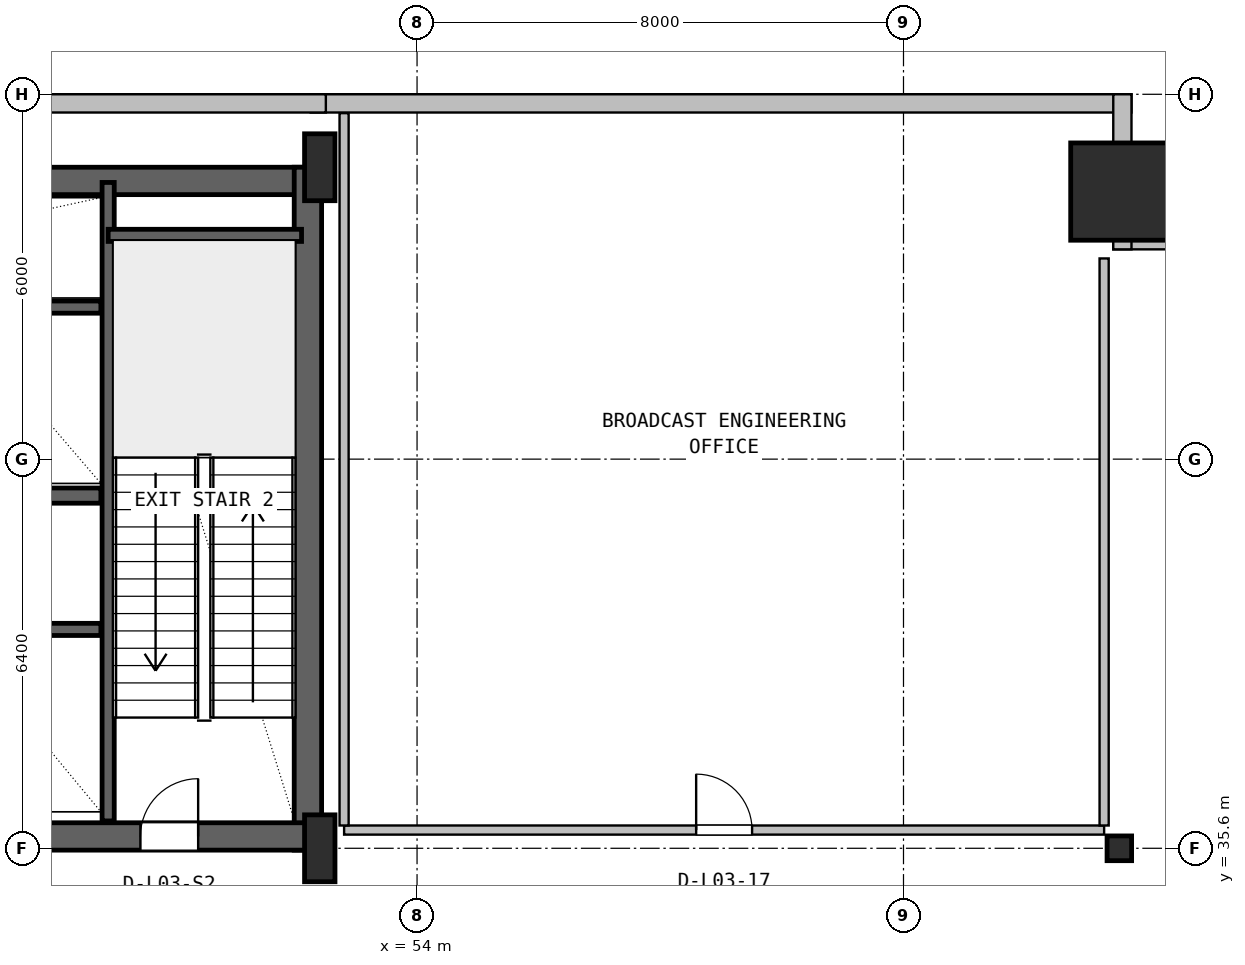
"""IFC4 building model, lengths in metres.
Left out: names, types, materials, properties, quantities, classifications, styles, units other than length and angle.
Written with IfcOpenShell. Run it as: python <this file> out.ifc"""

import sys

from ifc_helpers import new_model, si_unit, direction, frame, frame_2d, origin, origin_2d, place, context, subcontext, project, spatial, rectangle, hollow_rectangle, i_section, extrude, source, transform, mapped, element, fill, save


model = new_model("IFC4")
c1 = context("Model", 3, precision=1e-05, world=origin(), true_north=direction((0.0, 1.0)))
c2 = subcontext(c1, "Body", "Model", "MODEL_VIEW")
j1 = project(units=[si_unit("LENGTHUNIT", "METRE"), si_unit("PLANEANGLEUNIT", "RADIAN")], contexts=[c1])
p1 = place(None, origin())
s1 = spatial("IfcSite", under=j1, at=p1, CompositionType="ELEMENT")
p2 = place(p1, origin())
s2 = spatial("IfcBuilding", under=s1, at=p2, CompositionType="ELEMENT")
p3 = place(p2, frame((0.0, 0.0, 16.8)))
s3 = spatial("IfcBuildingStorey", under=s2, at=p3, CompositionType="ELEMENT", Elevation=16.8)
p4 = place(p3, frame((15.6, 46.575, 0.0), z_axis=(0.0, 0.0, 1.0), x_axis=(1.0, 0.0, 0.0)))
e1 = element("IfcWall", 1, at=p4, inside=s3, PredefinedType="SHEAR", context=c2, shape_type="SweptSolid", body=[
    extrude(rectangle(XDim=36.8, YDim=0.45, at=frame_2d((18.4, 0.0))), origin(), (0.0, 0.0, 1.0), 5.08),
])
p5 = place(p3, frame((52.205, 35.57, 0.0), z_axis=(0.0, 0.0, 1.0), x_axis=(0.0, 1.0, 0.0)))
e2 = element("IfcWall", 2, at=p5, inside=s3, PredefinedType="SHEAR", context=c2, shape_type="SweptSolid", body=[
    extrude(rectangle(XDim=11.23, YDim=0.45, at=frame_2d((5.615, 0.0))), origin(), (0.0, 0.0, 1.0), 5.08),
])
p6 = place(p3, frame((43.2, 35.795, 0.0), z_axis=(0.0, 0.0, 1.0), x_axis=(1.0, 0.0, 0.0)))
e3 = element("IfcWall", 3, at=p6, inside=s3, PredefinedType="SHEAR", context=c2, shape_type="SweptSolid", body=[
    extrude(rectangle(XDim=9.23, YDim=0.45, at=frame_2d((4.615, 0.0))), origin(), (0.0, 0.0, 1.0), 5.08),
])
p7 = place(p6, frame((6.25, 0.0, 0.0)))
e4 = element("IfcOpeningElement", 4, at=p7, cuts=e3, PredefinedType="OPENING", context=c2, shape_type="SweptSolid", body=[
    extrude(rectangle(XDim=0.95, YDim=2.1, at=frame_2d((0.475, 1.05))), frame((0.0, 0.235, 0.0), z_axis=(0.0, -1.0, 0.0), x_axis=(1.0, 0.0, 0.0)), (0.0, 0.0, 1.0), 0.47),
])
m1 = source(origin(), c2, "Body", "SweptSolid", [
    extrude(i_section(OverallWidth=0.5, OverallDepth=1.1, WebThickness=0.018, FlangeThickness=0.032, FilletRadius=0.018, at=origin_2d()), origin(), (0.0, 0.0, 1.0), 5.4),
])
for number, where, z_axis, x_axis in (
    (5, (52.4, 35.6, 0.0), (0.0, 0.0, 1.0), (1.0, 0.0, 0.0)),
    (6, (52.4, 46.8, 0.0), (0.0, 0.0, 1.0), (1.0, 0.0, 0.0)),
):
    element("IfcColumn", number, at=place(p3, frame(where, z_axis=z_axis, x_axis=x_axis)), inside=s3, PredefinedType="COLUMN", context=c2, shape_type="MappedRepresentation", body=[
        mapped(m1, transform((0.0, 0.0, 0.0), x_axis=(1.0, 0.0, 0.0), y_axis=(0.0, 1.0, 0.0), z_axis=(0.0, 0.0, 1.0), scale=1.0)),
    ])
m2 = source(origin(), c2, "Body", "SweptSolid", [
    extrude(hollow_rectangle(XDim=1.6, YDim=1.6, WallThickness=0.06, at=origin_2d()), origin(), (0.0, 0.0, 1.0), 5.4),
])
p8 = place(p3, frame((65.55, 46.4, 0.0), z_axis=(0.0, 0.0, 1.0), x_axis=(1.0, 0.0, 0.0)))
e7 = element("IfcColumn", 7, at=p8, inside=s3, PredefinedType="COLUMN", context=c2, shape_type="MappedRepresentation", body=[
    mapped(m2, transform((0.0, 0.0, 0.0), x_axis=(1.0, 0.0, 0.0), y_axis=(0.0, 1.0, 0.0), z_axis=(0.0, 0.0, 1.0), scale=1.0)),
])
m3 = source(origin(), c2, "Body", "SweptSolid", [
    extrude(i_section(OverallWidth=0.404, OverallDepth=0.407, WebThickness=0.027, FlangeThickness=0.044, FilletRadius=0.018, at=origin_2d()), origin(), (0.0, 0.0, 1.0), 5.4),
])
p9 = place(p3, frame((65.55, 35.6, 0.0), z_axis=(0.0, 0.0, 1.0), x_axis=(1.0, 0.0, 0.0)))
e8 = element("IfcColumn", 8, at=p9, inside=s3, PredefinedType="COLUMN", context=c2, shape_type="MappedRepresentation", body=[
    mapped(m3, transform((0.0, 0.0, 0.0), x_axis=(1.0, 0.0, 0.0), y_axis=(0.0, 1.0, 0.0), z_axis=(0.0, 0.0, 1.0), scale=1.0)),
])
p10 = place(p3, frame((52.25, 47.85, 0.0), z_axis=(0.0, 0.0, 1.0), x_axis=(1.0, 0.0, 0.0)))
e9 = element("IfcWall", 9, at=p10, inside=s3, PredefinedType="SOLIDWALL", context=c2, shape_type="SweptSolid", body=[
    extrude(rectangle(XDim=13.5, YDim=0.3, at=frame_2d((6.75, 0.0))), origin(), (0.0, 0.0, 1.0), 5.06),
])
p11 = place(p3, frame((15.5, 47.85, 0.0), z_axis=(0.0, 0.0, 1.0), x_axis=(1.0, 0.0, 0.0)))
e10 = element("IfcWall", 10, at=p11, inside=s3, PredefinedType="SOLIDWALL", context=c2, shape_type="SweptSolid", body=[
    extrude(rectangle(XDim=37.0, YDim=0.3, at=frame_2d((18.5, 0.0))), origin(), (0.0, 0.0, 1.0), 5.06),
])
for number, where, z_axis, x_axis in (
    (11, (65.45, 45.6, 0.0), (0.0, 0.0, 1.0), (1.0, 0.0, 0.0)),
    (12, (65.6, 45.45, 0.0), (0.0, 0.0, 1.0), (0.0, 1.0, 0.0)),
):
    element("IfcWall", number, at=place(p3, frame(where, z_axis=z_axis, x_axis=x_axis)), inside=s3, PredefinedType="SOLIDWALL", context=c2, shape_type="SweptSolid", body=[
        extrude(rectangle(XDim=2.55, YDim=0.3, at=frame_2d((1.275, 0.0))), origin(), (0.0, 0.0, 1.0), 4.143),
    ])
p12 = place(p3, frame((48.92, 36.05, 0.0), z_axis=(0.0, 0.0, 1.0), x_axis=(0.0, 1.0, 0.0)))
e13 = element("IfcWall", 13, at=p12, inside=s3, PredefinedType="SHEAR", context=c2, shape_type="SweptSolid", body=[
    extrude(rectangle(XDim=10.5, YDim=0.2, at=frame_2d((5.25, 0.0))), origin(), (0.0, 0.0, 1.0), 5.08),
])
p13 = place(p3, frame((48.92, 45.68, 0.0), z_axis=(0.0, 0.0, 1.0), x_axis=(1.0, 0.0, 0.0)))
e14 = element("IfcWall", 14, at=p13, inside=s3, PredefinedType="SHEAR", context=c2, shape_type="SweptSolid", body=[
    extrude(rectangle(XDim=3.18, YDim=0.2, at=frame_2d((1.59, 0.0))), origin(), (0.0, 0.0, 1.0), 5.08),
])
p14 = place(p3, frame((24.98, 41.4, 0.0), z_axis=(0.0, 0.0, 1.0), x_axis=(1.0, 0.0, 0.0)))
e15 = element("IfcWall", 15, at=p14, inside=s3, PredefinedType="SHEAR", context=c2, shape_type="SweptSolid", body=[
    extrude(rectangle(XDim=23.82, YDim=0.25, at=frame_2d((11.91, 0.0))), origin(), (0.0, 0.0, 1.0), 5.08),
])
p15 = place(p14, frame((0.87, 0.0, 0.0)))
e16 = element("IfcOpeningElement", 16, at=p15, cuts=e15, PredefinedType="OPENING", context=c2, shape_type="SweptSolid", body=[
    extrude(rectangle(XDim=1.1, YDim=2.18, at=frame_2d((0.55, 1.09))), frame((0.0, 0.135, 0.0), z_axis=(0.0, -1.0, 0.0), x_axis=(1.0, 0.0, 0.0)), (0.0, 0.0, 1.0), 0.27),
])
p16 = place(p14, frame((3.47, 0.0, 0.0)))
e17 = element("IfcOpeningElement", 17, at=p16, cuts=e15, PredefinedType="OPENING", context=c2, shape_type="SweptSolid", body=[
    extrude(rectangle(XDim=1.1, YDim=2.18, at=frame_2d((0.55, 1.09))), frame((0.0, 0.135, 0.0), z_axis=(0.0, -1.0, 0.0), x_axis=(1.0, 0.0, 0.0)), (0.0, 0.0, 1.0), 0.27),
])
p17 = place(p14, frame((6.07, 0.0, 0.0)))
e18 = element("IfcOpeningElement", 18, at=p17, cuts=e15, PredefinedType="OPENING", context=c2, shape_type="SweptSolid", body=[
    extrude(rectangle(XDim=1.1, YDim=2.18, at=frame_2d((0.55, 1.09))), frame((0.0, 0.135, 0.0), z_axis=(0.0, -1.0, 0.0), x_axis=(1.0, 0.0, 0.0)), (0.0, 0.0, 1.0), 0.27),
])
p18 = place(p3, frame((41.22, 44.5, 0.0), z_axis=(0.0, 0.0, 1.0), x_axis=(1.0, 0.0, 0.0)))
e19 = element("IfcWall", 19, at=p18, inside=s3, PredefinedType="SHEAR", context=c2, shape_type="SweptSolid", body=[
    extrude(rectangle(XDim=7.58, YDim=0.2, at=frame_2d((3.79, 0.0))), origin(), (0.0, 0.0, 1.0), 5.08),
])
p19 = place(p3, frame((43.65, 39.2, 0.0), z_axis=(0.0, 0.0, 1.0), x_axis=(1.0, 0.0, 0.0)))
e20 = element("IfcWall", 20, at=p19, inside=s3, PredefinedType="SHEAR", context=c2, shape_type="SweptSolid", body=[
    extrude(rectangle(XDim=5.15, YDim=0.2, at=frame_2d((2.575, 0.0))), origin(), (0.0, 0.0, 1.0), 5.08),
])
p20 = place(p3, frame((52.8, 35.9, 0.0), z_axis=(0.0, 0.0, 1.0), x_axis=(1.0, 0.0, 0.0)))
e21 = element("IfcWall", 21, at=p20, inside=s3, PredefinedType="PARTITIONING", context=c2, shape_type="SweptSolid", body=[
    extrude(rectangle(XDim=12.5, YDim=0.15, at=frame_2d((6.25, 0.0))), origin(), (0.0, 0.0, 1.0), 4.143),
])
p21 = place(p20, frame((5.79, 0.0, 0.0)))
e22 = element("IfcOpeningElement", 22, at=p21, cuts=e21, PredefinedType="OPENING", context=c2, shape_type="SweptSolid", body=[
    extrude(rectangle(XDim=0.92, YDim=2.08, at=frame_2d((0.46, 1.04))), frame((0.0, 0.085, 0.0), z_axis=(0.0, -1.0, 0.0), x_axis=(1.0, 0.0, 0.0)), (0.0, 0.0, 1.0), 0.17),
])
p22 = place(p3, frame((65.3, 35.975, 0.0), z_axis=(0.0, 0.0, 1.0), x_axis=(0.0, 1.0, 0.0)))
e23 = element("IfcWall", 23, at=p22, inside=s3, PredefinedType="PARTITIONING", context=c2, shape_type="SweptSolid", body=[
    extrude(rectangle(XDim=9.325, YDim=0.15, at=frame_2d((4.663, 0.0))), origin(), (0.0, 0.0, 1.0), 4.143),
])
p23 = place(p3, frame((52.8, 35.975, 0.0), z_axis=(0.0, 0.0, 1.0), x_axis=(0.0, 1.0, 0.0)))
e24 = element("IfcWall", 24, at=p23, inside=s3, PredefinedType="PARTITIONING", context=c2, shape_type="SweptSolid", body=[
    extrude(rectangle(XDim=11.715, YDim=0.15, at=frame_2d((5.857, 0.0))), origin(), (0.0, 0.0, 1.0), 4.143),
])
m4 = source(origin(), c2, "Body", "SweptSolid", [
    extrude(rectangle(XDim=0.95, YDim=2.1, at=frame_2d((0.475, 1.05))), frame((0.0, 0.025, 0.0), z_axis=(0.0, -1.0, 0.0), x_axis=(1.0, 0.0, 0.0)), (0.0, 0.0, 1.0), 0.05),
])
p24 = place(p7, origin())
e25 = element("IfcDoor", 25, at=p24, inside=s3, OperationType="SINGLE_SWING_RIGHT", PredefinedType="DOOR", context=c2, shape_type="MappedRepresentation", body=[
    mapped(m4, transform((0.0, 0.0, 0.0), x_axis=(1.0, 0.0, 0.0), y_axis=(0.0, 1.0, 0.0), z_axis=(0.0, 0.0, 1.0), scale=1.0)),
])
fill(e4, e25)
m5 = source(origin(), c2, "Body", "SweptSolid", [
    extrude(rectangle(XDim=0.92, YDim=2.08, at=frame_2d((0.46, 1.04))), frame((0.0, 0.025, 0.0), z_axis=(0.0, -1.0, 0.0), x_axis=(1.0, 0.0, 0.0)), (0.0, 0.0, 1.0), 0.05),
])
p25 = place(p21, origin())
e26 = element("IfcDoor", 26, at=p25, inside=s3, OperationType="SINGLE_SWING_LEFT", PredefinedType="DOOR", context=c2, shape_type="MappedRepresentation", body=[
    mapped(m5, transform((0.0, 0.0, 0.0), x_axis=(1.0, 0.0, 0.0), y_axis=(0.0, 1.0, 0.0), z_axis=(0.0, 0.0, 1.0), scale=1.0)),
])
fill(e22, e26)
save(model, sys.argv[1])
